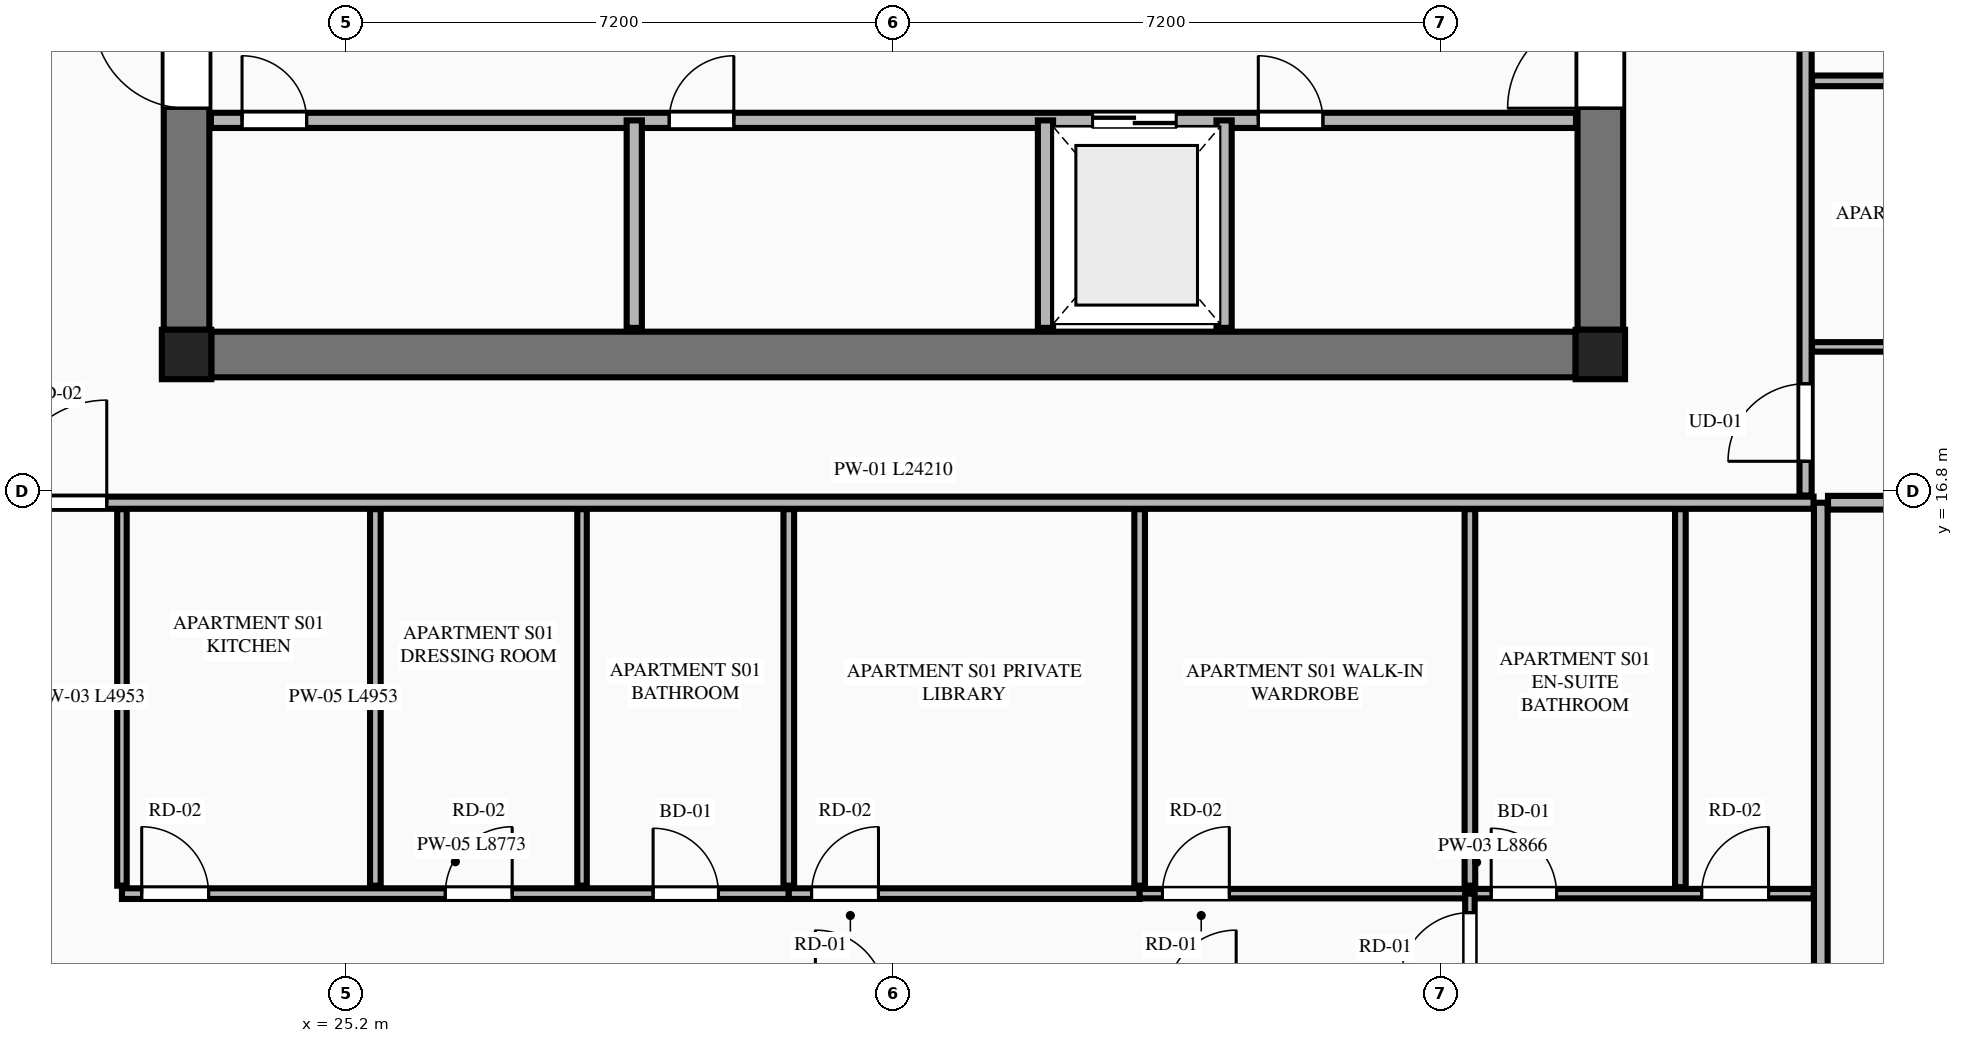
"""IFC4 building model, lengths in metres.
Left out: names, types, materials, properties, quantities, classifications, styles, units other than length and angle.
Written with IfcOpenShell. Run it as: python <this file> out.ifc"""

import sys

from ifc_helpers import new_model, si_unit, direction, frame, frame_2d, origin, origin_2d, place, context, subcontext, project, spatial, rectangle, extrude, element, fill, save


model = new_model("IFC4")
c1 = context("Model", 3, precision=1e-05, world=origin(), true_north=direction((0.0, 1.0)))
c2 = subcontext(c1, "Body", "Model", "MODEL_VIEW")
j1 = project(units=[si_unit("LENGTHUNIT", "METRE"), si_unit("PLANEANGLEUNIT", "RADIAN")], contexts=[c1])
p1 = place(None, origin())
s1 = spatial("IfcSite", under=j1, at=p1, CompositionType="ELEMENT")
p2 = place(p1, origin())
s2 = spatial("IfcBuilding", under=s1, at=p2, CompositionType="ELEMENT")
p3 = place(p2, frame((0.0, 0.0, 160.6)))
s3 = spatial("IfcBuildingStorey", under=s2, at=p3, CompositionType="ELEMENT", Elevation=160.6)
for number, where, z_axis, x_axis in (
    (1, (23.1, 18.6, 0.0), (0.0, 0.0, 1.0), (1.0, 0.0, 0.0)),
    (2, (41.7, 18.6, 0.0), (0.0, 0.0, 1.0), (1.0, 0.0, 0.0)),
):
    element("IfcColumn", number, at=place(p3, frame(where, z_axis=z_axis, x_axis=x_axis)), inside=s3, PredefinedType="COLUMN", context=c2, shape_type="SweptSolid", body=[
        extrude(rectangle(XDim=0.65, YDim=0.65, at=origin_2d()), origin(), (0.0, 0.0, 1.0), 3.55),
    ])
p4 = place(p3, frame((23.425, 18.6, 0.0), z_axis=(0.0, 0.0, 1.0), x_axis=(1.0, 0.0, 0.0)))
e3 = element("IfcWall", 3, at=p4, inside=s3, PredefinedType="SHEAR", context=c2, shape_type="SweptSolid", body=[
    extrude(rectangle(XDim=17.95, YDim=0.6, at=frame_2d((8.975, 0.0))), origin(), (0.0, 0.0, 1.0), 3.34),
])
p5 = place(p3, frame((23.1, 18.925, 0.0), z_axis=(0.0, 0.0, 1.0), x_axis=(0.0, 1.0, 0.0)))
e4 = element("IfcWall", 4, at=p5, inside=s3, PredefinedType="SHEAR", context=c2, shape_type="SweptSolid", body=[
    extrude(rectangle(XDim=13.95, YDim=0.6, at=frame_2d((6.975, 0.0))), origin(), (0.0, 0.0, 1.0), 3.34),
])
p6 = place(p5, frame((2.915, 0.0, 0.0)))
e5 = element("IfcOpeningElement", 5, at=p6, cuts=e4, PredefinedType="OPENING", context=c2, shape_type="SweptSolid", body=[
    extrude(rectangle(XDim=1.22, YDim=2.25, at=frame_2d((0.61, 1.125))), frame((0.0, 0.31, 0.0), z_axis=(0.0, -1.0, 0.0), x_axis=(1.0, 0.0, 0.0)), (0.0, 0.0, 1.0), 0.62),
])
p7 = place(p3, frame((41.7, 18.925, 0.0), z_axis=(0.0, 0.0, 1.0), x_axis=(0.0, 1.0, 0.0)))
e6 = element("IfcWall", 6, at=p7, inside=s3, PredefinedType="SHEAR", context=c2, shape_type="SweptSolid", body=[
    extrude(rectangle(XDim=13.95, YDim=0.6, at=frame_2d((6.975, 0.0))), origin(), (0.0, 0.0, 1.0), 3.34),
])
p8 = place(p7, frame((2.915, 0.0, 0.0)))
e7 = element("IfcOpeningElement", 7, at=p8, cuts=e6, PredefinedType="OPENING", context=c2, shape_type="SweptSolid", body=[
    extrude(rectangle(XDim=1.22, YDim=2.25, at=frame_2d((0.61, 1.125))), frame((0.0, 0.31, 0.0), z_axis=(0.0, -1.0, 0.0), x_axis=(1.0, 0.0, 0.0)), (0.0, 0.0, 1.0), 0.62),
])
p9 = place(p3, frame((23.42, 21.68, 0.0), z_axis=(0.0, 0.0, 1.0), x_axis=(1.0, 0.0, 0.0)))
e8 = element("IfcWall", 8, at=p9, inside=s3, PredefinedType="PLUMBINGWALL", context=c2, shape_type="SweptSolid", body=[
    extrude(rectangle(XDim=17.96, YDim=0.2, at=frame_2d((8.98, 0.0))), origin(), (0.0, 0.0, 1.0), 3.34),
])
p10 = place(p9, frame((11.6, 0.0, 0.0)))
e9 = element("IfcOpeningElement", 9, at=p10, cuts=e8, PredefinedType="OPENING", context=c2, shape_type="SweptSolid", body=[
    extrude(rectangle(XDim=1.1, YDim=2.2, at=frame_2d((0.55, 1.1))), frame((0.0, 0.11, 0.0), z_axis=(0.0, -1.0, 0.0), x_axis=(1.0, 0.0, 0.0)), (0.0, 0.0, 1.0), 0.22),
])
p11 = place(p9, frame((0.41, 0.0, 0.0)))
e10 = element("IfcOpeningElement", 10, at=p11, cuts=e8, PredefinedType="OPENING", context=c2, shape_type="SweptSolid", body=[
    extrude(rectangle(XDim=0.85, YDim=2.05, at=frame_2d((0.425, 1.025))), frame((0.0, 0.11, 0.0), z_axis=(0.0, -1.0, 0.0), x_axis=(1.0, 0.0, 0.0)), (0.0, 0.0, 1.0), 0.22),
])
p12 = place(p9, frame((6.03, 0.0, 0.0)))
e11 = element("IfcOpeningElement", 11, at=p12, cuts=e8, PredefinedType="OPENING", context=c2, shape_type="SweptSolid", body=[
    extrude(rectangle(XDim=0.85, YDim=2.05, at=frame_2d((0.425, 1.025))), frame((0.0, 0.11, 0.0), z_axis=(0.0, -1.0, 0.0), x_axis=(1.0, 0.0, 0.0)), (0.0, 0.0, 1.0), 0.22),
])
p13 = place(p9, frame((13.78, 0.0, 0.0)))
e12 = element("IfcOpeningElement", 12, at=p13, cuts=e8, PredefinedType="OPENING", context=c2, shape_type="SweptSolid", body=[
    extrude(rectangle(XDim=0.85, YDim=2.05, at=frame_2d((0.425, 1.025))), frame((0.0, 0.11, 0.0), z_axis=(0.0, -1.0, 0.0), x_axis=(1.0, 0.0, 0.0)), (0.0, 0.0, 1.0), 0.22),
])
for number, where, z_axis, x_axis in (
    (13, (34.4, 18.95, 0.0), (0.0, 0.0, 1.0), (0.0, 1.0, 0.0)),
    (14, (36.75, 18.95, 0.0), (0.0, 0.0, 1.0), (0.0, 1.0, 0.0)),
    (15, (28.99, 18.95, 0.0), (0.0, 0.0, 1.0), (0.0, 1.0, 0.0)),
):
    element("IfcWall", number, at=place(p3, frame(where, z_axis=z_axis, x_axis=x_axis)), inside=s3, PredefinedType="PLUMBINGWALL", context=c2, shape_type="SweptSolid", body=[
        extrude(rectangle(XDim=2.73, YDim=0.2, at=frame_2d((1.365, 0.0))), origin(), (0.0, 0.0, 1.0), 3.34),
    ])
p14 = place(p3, frame((44.6, 4.105, 0.0), z_axis=(0.0, 0.0, 1.0), x_axis=(0.0, 1.0, 0.0)))
e16 = element("IfcWall", 16, at=p14, inside=s3, PredefinedType="PARTITIONING", context=c2, shape_type="SweptSolid", body=[
    extrude(rectangle(XDim=12.545, YDim=0.18, at=frame_2d((6.272, 0.0))), origin(), (0.0, 0.0, 1.0), 3.34),
])
p15 = place(p3, frame((20.295, 16.65, 0.0), z_axis=(0.0, 0.0, 1.0), x_axis=(1.0, 0.0, 0.0)))
e17 = element("IfcWall", 17, at=p15, inside=s3, PredefinedType="PARTITIONING", context=c2, shape_type="SweptSolid", body=[
    extrude(rectangle(XDim=24.21, YDim=0.16, at=frame_2d((12.105, 0.0))), origin(), (0.0, 0.0, 1.0), 3.34),
])
p16 = place(p15, frame((0.405, 0.0, 0.0)))
e18 = element("IfcOpeningElement", 18, at=p16, cuts=e17, PredefinedType="OPENING", context=c2, shape_type="SweptSolid", body=[
    extrude(rectangle(XDim=1.35, YDim=2.35, at=frame_2d((0.675, 1.175))), frame((0.0, 0.09, 0.0), z_axis=(0.0, -1.0, 0.0), x_axis=(1.0, 0.0, 0.0)), (0.0, 0.0, 1.0), 0.18),
])
p17 = place(p3, frame((22.25, 11.612, 0.0), z_axis=(0.0, 0.0, 1.0), x_axis=(0.0, 1.0, 0.0)))
e19 = element("IfcWall", 19, at=p17, inside=s3, PredefinedType="PARTITIONING", context=c2, shape_type="SweptSolid", body=[
    extrude(rectangle(XDim=4.953, YDim=0.125, at=frame_2d((2.477, 0.0))), origin(), (0.0, 0.0, 1.0), 2.722),
])
p18 = place(p3, frame((22.25, 11.507, 0.0), z_axis=(0.0, 0.0, 1.0), x_axis=(1.0, 0.0, 0.0)))
e20 = element("IfcWall", 20, at=p18, inside=s3, PredefinedType="PLUMBINGWALL", context=c2, shape_type="SweptSolid", body=[
    extrude(rectangle(XDim=8.773, YDim=0.14, at=frame_2d((4.386, 0.0))), origin(), (0.0, 0.0, 1.0), 3.34),
])
p19 = place(p18, frame((6.988, 0.0, 0.0)))
e21 = element("IfcOpeningElement", 21, at=p19, cuts=e20, PredefinedType="OPENING", context=c2, shape_type="SweptSolid", body=[
    extrude(rectangle(XDim=0.86, YDim=2.1, at=frame_2d((0.43, 1.05))), frame((0.0, 0.08, 0.0), z_axis=(0.0, -1.0, 0.0), x_axis=(1.0, 0.0, 0.0)), (0.0, 0.0, 1.0), 0.16),
])
p20 = place(p18, frame((0.26, 0.0, 0.0)))
e22 = element("IfcOpeningElement", 22, at=p20, cuts=e20, PredefinedType="OPENING", context=c2, shape_type="SweptSolid", body=[
    extrude(rectangle(XDim=0.88, YDim=2.15, at=frame_2d((0.44, 1.075))), frame((0.0, 0.08, 0.0), z_axis=(0.0, -1.0, 0.0), x_axis=(1.0, 0.0, 0.0)), (0.0, 0.0, 1.0), 0.16),
])
p21 = place(p18, frame((4.254, 0.0, 0.0)))
e23 = element("IfcOpeningElement", 23, at=p21, cuts=e20, PredefinedType="OPENING", context=c2, shape_type="SweptSolid", body=[
    extrude(rectangle(XDim=0.88, YDim=2.15, at=frame_2d((0.44, 1.075))), frame((0.0, 0.08, 0.0), z_axis=(0.0, -1.0, 0.0), x_axis=(1.0, 0.0, 0.0)), (0.0, 0.0, 1.0), 0.16),
])
p22 = place(p3, frame((31.023, 11.507, 0.0), z_axis=(0.0, 0.0, 1.0), x_axis=(1.0, 0.0, 0.0)))
e24 = element("IfcWall", 24, at=p22, inside=s3, PredefinedType="PLUMBINGWALL", context=c2, shape_type="SweptSolid", body=[
    extrude(rectangle(XDim=4.616, YDim=0.14, at=frame_2d((2.308, 0.0))), origin(), (0.0, 0.0, 1.0), 3.34),
])
p23 = place(p22, frame((0.3, 0.0, 0.0)))
e25 = element("IfcOpeningElement", 25, at=p23, cuts=e24, PredefinedType="OPENING", context=c2, shape_type="SweptSolid", body=[
    extrude(rectangle(XDim=0.88, YDim=2.15, at=frame_2d((0.44, 1.075))), frame((0.0, 0.08, 0.0), z_axis=(0.0, -1.0, 0.0), x_axis=(1.0, 0.0, 0.0)), (0.0, 0.0, 1.0), 0.16),
])
p24 = place(p3, frame((35.639, 11.507, 0.0), z_axis=(0.0, 0.0, 1.0), x_axis=(1.0, 0.0, 0.0)))
e26 = element("IfcWall", 26, at=p24, inside=s3, PredefinedType="PARTITIONING", context=c2, shape_type="SweptSolid", body=[
    extrude(rectangle(XDim=8.866, YDim=0.125, at=frame_2d((4.433, 0.0))), origin(), (0.0, 0.0, 1.0), 3.34),
])
p25 = place(p24, frame((4.625, 0.0, 0.0)))
e27 = element("IfcOpeningElement", 27, at=p25, cuts=e26, PredefinedType="OPENING", context=c2, shape_type="SweptSolid", body=[
    extrude(rectangle(XDim=0.86, YDim=2.1, at=frame_2d((0.43, 1.05))), frame((0.0, 0.073, 0.0), z_axis=(0.0, -1.0, 0.0), x_axis=(1.0, 0.0, 0.0)), (0.0, 0.0, 1.0), 0.145),
])
p26 = place(p24, frame((7.394, 0.0, 0.0)))
e28 = element("IfcOpeningElement", 28, at=p26, cuts=e26, PredefinedType="OPENING", context=c2, shape_type="SweptSolid", body=[
    extrude(rectangle(XDim=0.88, YDim=2.15, at=frame_2d((0.44, 1.075))), frame((0.0, 0.073, 0.0), z_axis=(0.0, -1.0, 0.0), x_axis=(1.0, 0.0, 0.0)), (0.0, 0.0, 1.0), 0.145),
])
p27 = place(p24, frame((0.3, 0.0, 0.0)))
e29 = element("IfcOpeningElement", 29, at=p27, cuts=e26, PredefinedType="OPENING", context=c2, shape_type="SweptSolid", body=[
    extrude(rectangle(XDim=0.88, YDim=2.15, at=frame_2d((0.44, 1.075))), frame((0.0, 0.073, 0.0), z_axis=(0.0, -1.0, 0.0), x_axis=(1.0, 0.0, 0.0)), (0.0, 0.0, 1.0), 0.145),
])
p28 = place(p3, frame((25.584, 11.612, 0.0), z_axis=(0.0, 0.0, 1.0), x_axis=(0.0, 1.0, 0.0)))
e30 = element("IfcWall", 30, at=p28, inside=s3, PredefinedType="PLUMBINGWALL", context=c2, shape_type="SweptSolid", body=[
    extrude(rectangle(XDim=4.953, YDim=0.14, at=frame_2d((2.477, 0.0))), origin(), (0.0, 0.0, 1.0), 3.34),
])
p29 = place(p3, frame((28.303, 11.612, 0.0), z_axis=(0.0, 0.0, 1.0), x_axis=(0.0, 1.0, 0.0)))
e31 = element("IfcWall", 31, at=p29, inside=s3, PredefinedType="PARTITIONING", context=c2, shape_type="SweptSolid", body=[
    extrude(rectangle(XDim=4.953, YDim=0.125, at=frame_2d((2.477, 0.0))), origin(), (0.0, 0.0, 1.0), 3.34),
])
p30 = place(p3, frame((39.984, 10.177, 0.0), z_axis=(0.0, 0.0, 1.0), x_axis=(0.0, 1.0, 0.0)))
e32 = element("IfcWall", 32, at=p30, inside=s3, PredefinedType="PARTITIONING", context=c2, shape_type="SweptSolid", body=[
    extrude(rectangle(XDim=1.33, YDim=0.125, at=frame_2d((0.665, 0.0))), origin(), (0.0, 0.0, 1.0), 3.34),
])
p31 = place(p30, frame((0.16, 0.0, 0.0)))
e33 = element("IfcOpeningElement", 33, at=p31, cuts=e32, PredefinedType="OPENING", context=c2, shape_type="SweptSolid", body=[
    extrude(rectangle(XDim=0.92, YDim=2.15, at=frame_2d((0.46, 1.075))), frame((0.0, 0.073, 0.0), z_axis=(0.0, -1.0, 0.0), x_axis=(1.0, 0.0, 0.0)), (0.0, 0.0, 1.0), 0.145),
])
for number, where, z_axis, x_axis in (
    (34, (31.023, 11.612, 0.0), (0.0, 0.0, 1.0), (0.0, 1.0, 0.0)),
    (35, (35.639, 11.612, 0.0), (0.0, 0.0, 1.0), (0.0, 1.0, 0.0)),
    (36, (39.984, 11.612, 0.0), (0.0, 0.0, 1.0), (0.0, 1.0, 0.0)),
):
    element("IfcWall", number, at=place(p3, frame(where, z_axis=z_axis, x_axis=x_axis)), inside=s3, PredefinedType="PLUMBINGWALL", context=c2, shape_type="SweptSolid", body=[
        extrude(rectangle(XDim=4.953, YDim=0.14, at=frame_2d((2.477, 0.0))), origin(), (0.0, 0.0, 1.0), 3.34),
    ])
p32 = place(p3, frame((42.753, 11.592, 0.0), z_axis=(0.0, 0.0, 1.0), x_axis=(0.0, 1.0, 0.0)))
e37 = element("IfcWall", 37, at=p32, inside=s3, PredefinedType="PLUMBINGWALL", context=c2, shape_type="SweptSolid", body=[
    extrude(rectangle(XDim=4.973, YDim=0.14, at=frame_2d((2.486, 0.0))), origin(), (0.0, 0.0, 1.0), 2.722),
])
p33 = place(p3, frame((44.695, 16.65, 0.0), z_axis=(0.0, 0.0, 1.0), x_axis=(1.0, 0.0, 0.0)))
e38 = element("IfcWall", 38, at=p33, inside=s3, PredefinedType="PARTITIONING", context=c2, shape_type="SweptSolid", body=[
    extrude(rectangle(XDim=7.996, YDim=0.18, at=frame_2d((3.998, 0.0))), origin(), (0.0, 0.0, 1.0), 3.34),
])
p34 = place(p3, frame((44.4, 16.745, 0.0), z_axis=(0.0, 0.0, 1.0), x_axis=(0.0, 1.0, 0.0)))
e39 = element("IfcWall", 39, at=p34, inside=s3, PredefinedType="PARTITIONING", context=c2, shape_type="SweptSolid", body=[
    extrude(rectangle(XDim=18.31, YDim=0.16, at=frame_2d((9.155, 0.0))), origin(), (0.0, 0.0, 1.0), 3.34),
])
p35 = place(p34, frame((0.45, 0.0, 0.0)))
e40 = element("IfcOpeningElement", 40, at=p35, cuts=e39, PredefinedType="OPENING", context=c2, shape_type="SweptSolid", body=[
    extrude(rectangle(XDim=1.02, YDim=2.25, at=frame_2d((0.51, 1.125))), frame((0.0, 0.09, 0.0), z_axis=(0.0, -1.0, 0.0), x_axis=(1.0, 0.0, 0.0)), (0.0, 0.0, 1.0), 0.18),
])
p36 = place(p3, frame((44.485, 18.7, 0.0), z_axis=(0.0, 0.0, 1.0), x_axis=(1.0, 0.0, 0.0)))
e41 = element("IfcWall", 41, at=p36, inside=s3, PredefinedType="PARTITIONING", context=c2, shape_type="SweptSolid", body=[
    extrude(rectangle(XDim=3.98, YDim=0.125, at=frame_2d((1.99, 0.0))), origin(), (0.0, 0.0, 1.0), 2.722),
])
p37 = place(p3, frame((44.485, 22.2, 0.0), z_axis=(0.0, 0.0, 1.0), x_axis=(1.0, 0.0, 0.0)))
e42 = element("IfcWall", 42, at=p37, inside=s3, PredefinedType="PLUMBINGWALL", context=c2, shape_type="SweptSolid", body=[
    extrude(rectangle(XDim=3.98, YDim=0.14, at=frame_2d((1.99, 0.0))), origin(), (0.0, 0.0, 1.0), 3.34),
])
p38 = place(p6, origin())
e43 = element("IfcDoor", 43, at=p38, inside=s3, OperationType="SINGLE_SWING_RIGHT", PredefinedType="DOOR", context=c2, shape_type="SweptSolid", body=[
    extrude(rectangle(XDim=1.22, YDim=2.25, at=frame_2d((0.61, 1.125))), frame((0.0, 0.025, 0.0), z_axis=(0.0, -1.0, 0.0), x_axis=(1.0, 0.0, 0.0)), (0.0, 0.0, 1.0), 0.05),
])
fill(e5, e43)
p39 = place(p8, origin())
e44 = element("IfcDoor", 44, at=p39, inside=s3, OperationType="SINGLE_SWING_LEFT", PredefinedType="DOOR", context=c2, shape_type="SweptSolid", body=[
    extrude(rectangle(XDim=1.22, YDim=2.25, at=frame_2d((0.61, 1.125))), frame((0.0, 0.025, 0.0), z_axis=(0.0, -1.0, 0.0), x_axis=(1.0, 0.0, 0.0)), (0.0, 0.0, 1.0), 0.05),
])
fill(e7, e44)
p40 = place(p10, origin())
e45 = element("IfcDoor", 45, at=p40, inside=s3, OperationType="DOUBLE_DOOR_SLIDING", PredefinedType="DOOR", context=c2, shape_type="SweptSolid", body=[
    extrude(rectangle(XDim=1.1, YDim=2.2, at=frame_2d((0.55, 1.1))), frame((0.0, 0.025, 0.0), z_axis=(0.0, -1.0, 0.0), x_axis=(1.0, 0.0, 0.0)), (0.0, 0.0, 1.0), 0.05),
])
fill(e9, e45)
p41 = place(p11, origin())
e46 = element("IfcDoor", 46, at=p41, inside=s3, OperationType="SINGLE_SWING_LEFT", PredefinedType="DOOR", context=c2, shape_type="SweptSolid", body=[
    extrude(rectangle(XDim=0.85, YDim=2.05, at=frame_2d((0.425, 1.025))), frame((0.0, 0.025, 0.0), z_axis=(0.0, -1.0, 0.0), x_axis=(1.0, 0.0, 0.0)), (0.0, 0.0, 1.0), 0.05),
])
fill(e10, e46)
p42 = place(p12, origin())
e47 = element("IfcDoor", 47, at=p42, inside=s3, OperationType="SINGLE_SWING_RIGHT", PredefinedType="DOOR", context=c2, shape_type="SweptSolid", body=[
    extrude(rectangle(XDim=0.85, YDim=2.05, at=frame_2d((0.425, 1.025))), frame((0.0, 0.025, 0.0), z_axis=(0.0, -1.0, 0.0), x_axis=(1.0, 0.0, 0.0)), (0.0, 0.0, 1.0), 0.05),
])
fill(e11, e47)
p43 = place(p13, origin())
e48 = element("IfcDoor", 48, at=p43, inside=s3, OperationType="SINGLE_SWING_LEFT", PredefinedType="DOOR", context=c2, shape_type="SweptSolid", body=[
    extrude(rectangle(XDim=0.85, YDim=2.05, at=frame_2d((0.425, 1.025))), frame((0.0, 0.025, 0.0), z_axis=(0.0, -1.0, 0.0), x_axis=(1.0, 0.0, 0.0)), (0.0, 0.0, 1.0), 0.05),
])
fill(e12, e48)
p44 = place(p19, origin())
e49 = element("IfcDoor", 49, at=p44, inside=s3, OperationType="SINGLE_SWING_LEFT", PredefinedType="DOOR", context=c2, shape_type="SweptSolid", body=[
    extrude(rectangle(XDim=0.86, YDim=2.1, at=frame_2d((0.43, 1.05))), frame((0.0, 0.025, 0.0), z_axis=(0.0, -1.0, 0.0), x_axis=(1.0, 0.0, 0.0)), (0.0, 0.0, 1.0), 0.05),
])
fill(e21, e49)
p45 = place(p25, origin())
e50 = element("IfcDoor", 50, at=p45, inside=s3, OperationType="SINGLE_SWING_LEFT", PredefinedType="DOOR", context=c2, shape_type="SweptSolid", body=[
    extrude(rectangle(XDim=0.86, YDim=2.1, at=frame_2d((0.43, 1.05))), frame((0.0, 0.025, 0.0), z_axis=(0.0, -1.0, 0.0), x_axis=(1.0, 0.0, 0.0)), (0.0, 0.0, 1.0), 0.05),
])
fill(e27, e50)
p46 = place(p26, origin())
e51 = element("IfcDoor", 51, at=p46, inside=s3, OperationType="SINGLE_SWING_RIGHT", PredefinedType="DOOR", context=c2, shape_type="SweptSolid", body=[
    extrude(rectangle(XDim=0.88, YDim=2.15, at=frame_2d((0.44, 1.075))), frame((0.0, 0.025, 0.0), z_axis=(0.0, -1.0, 0.0), x_axis=(1.0, 0.0, 0.0)), (0.0, 0.0, 1.0), 0.05),
])
fill(e28, e51)
p47 = place(p16, origin())
e52 = element("IfcDoor", 52, at=p47, inside=s3, OperationType="SINGLE_SWING_RIGHT", PredefinedType="DOOR", context=c2, shape_type="SweptSolid", body=[
    extrude(rectangle(XDim=1.35, YDim=2.35, at=frame_2d((0.675, 1.175))), frame((0.0, 0.025, 0.0), z_axis=(0.0, -1.0, 0.0), x_axis=(1.0, 0.0, 0.0)), (0.0, 0.0, 1.0), 0.05),
])
fill(e18, e52)
p48 = place(p20, origin())
e53 = element("IfcDoor", 53, at=p48, inside=s3, OperationType="SINGLE_SWING_LEFT", PredefinedType="DOOR", context=c2, shape_type="SweptSolid", body=[
    extrude(rectangle(XDim=0.88, YDim=2.15, at=frame_2d((0.44, 1.075))), frame((0.0, 0.025, 0.0), z_axis=(0.0, -1.0, 0.0), x_axis=(1.0, 0.0, 0.0)), (0.0, 0.0, 1.0), 0.05),
])
fill(e22, e53)
p49 = place(p21, origin())
e54 = element("IfcDoor", 54, at=p49, inside=s3, OperationType="SINGLE_SWING_RIGHT", PredefinedType="DOOR", context=c2, shape_type="SweptSolid", body=[
    extrude(rectangle(XDim=0.88, YDim=2.15, at=frame_2d((0.44, 1.075))), frame((0.0, 0.025, 0.0), z_axis=(0.0, -1.0, 0.0), x_axis=(1.0, 0.0, 0.0)), (0.0, 0.0, 1.0), 0.05),
])
fill(e23, e54)
p50 = place(p23, origin())
e55 = element("IfcDoor", 55, at=p50, inside=s3, OperationType="SINGLE_SWING_RIGHT", PredefinedType="DOOR", context=c2, shape_type="SweptSolid", body=[
    extrude(rectangle(XDim=0.88, YDim=2.15, at=frame_2d((0.44, 1.075))), frame((0.0, 0.025, 0.0), z_axis=(0.0, -1.0, 0.0), x_axis=(1.0, 0.0, 0.0)), (0.0, 0.0, 1.0), 0.05),
])
fill(e25, e55)
p51 = place(p31, origin())
e56 = element("IfcDoor", 56, at=p51, inside=s3, OperationType="SINGLE_SWING_LEFT", PredefinedType="DOOR", context=c2, shape_type="SweptSolid", body=[
    extrude(rectangle(XDim=0.92, YDim=2.15, at=frame_2d((0.46, 1.075))), frame((0.0, 0.025, 0.0), z_axis=(0.0, -1.0, 0.0), x_axis=(1.0, 0.0, 0.0)), (0.0, 0.0, 1.0), 0.05),
])
fill(e33, e56)
p52 = place(p27, origin())
e57 = element("IfcDoor", 57, at=p52, inside=s3, OperationType="SINGLE_SWING_RIGHT", PredefinedType="DOOR", context=c2, shape_type="SweptSolid", body=[
    extrude(rectangle(XDim=0.88, YDim=2.15, at=frame_2d((0.44, 1.075))), frame((0.0, 0.025, 0.0), z_axis=(0.0, -1.0, 0.0), x_axis=(1.0, 0.0, 0.0)), (0.0, 0.0, 1.0), 0.05),
])
fill(e29, e57)
p53 = place(p35, origin())
e58 = element("IfcDoor", 58, at=p53, inside=s3, OperationType="SINGLE_SWING_LEFT", PredefinedType="DOOR", context=c2, shape_type="SweptSolid", body=[
    extrude(rectangle(XDim=1.02, YDim=2.25, at=frame_2d((0.51, 1.125))), frame((0.0, 0.025, 0.0), z_axis=(0.0, -1.0, 0.0), x_axis=(1.0, 0.0, 0.0)), (0.0, 0.0, 1.0), 0.05),
])
fill(e40, e58)
save(model, sys.argv[1])
